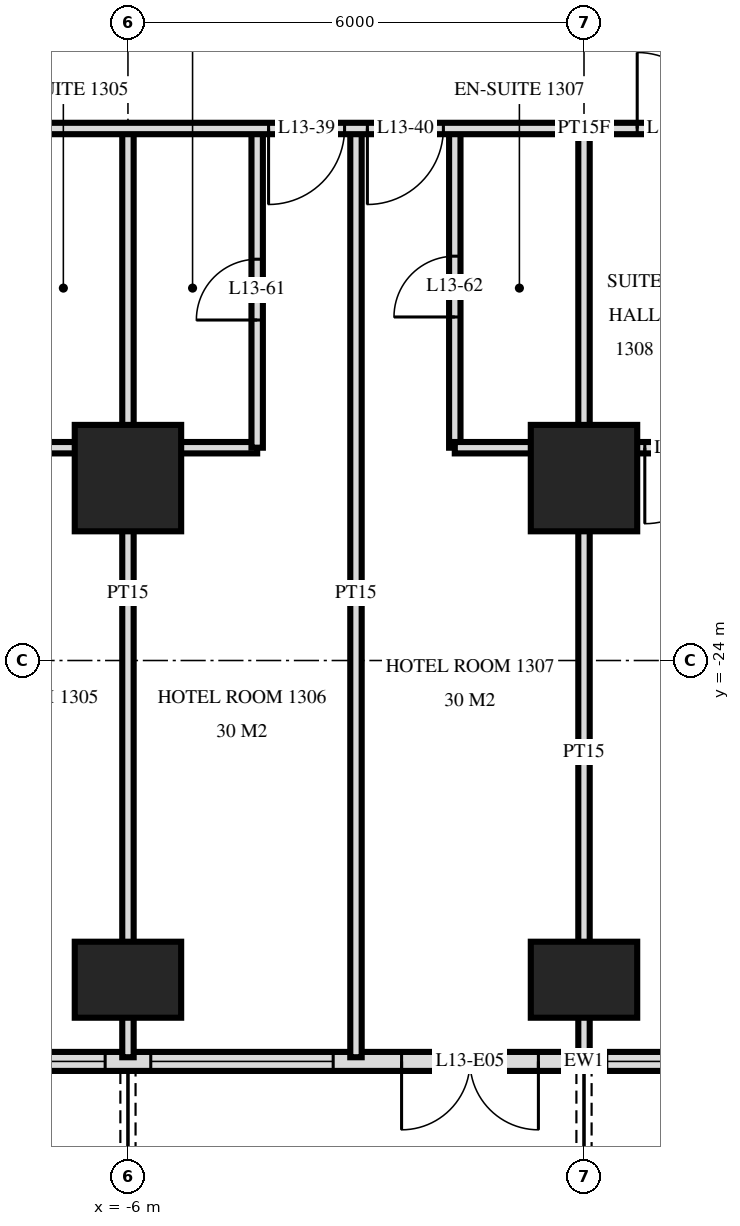
"""IFC4 building model, lengths in metres.
Left out: names, types, materials, properties, quantities, classifications, styles, units other than length and angle.
Written with IfcOpenShell. Run it as: python <this file> out.ifc"""

import sys

from ifc_helpers import new_model, si_unit, direction, frame, frame_2d, origin, origin_2d, place, context, subcontext, project, spatial, rectangle, extrude, element, fill, save


model = new_model("IFC4")
c1 = context("Model", 3, precision=1e-05, world=origin(), true_north=direction((0.0, 1.0)))
c2 = subcontext(c1, "Body", "Model", "MODEL_VIEW")
j1 = project(units=[si_unit("LENGTHUNIT", "METRE"), si_unit("PLANEANGLEUNIT", "RADIAN")], contexts=[c1])
p1 = place(None, origin())
s1 = spatial("IfcSite", under=j1, at=p1, CompositionType="ELEMENT")
p2 = place(p1, origin())
s2 = spatial("IfcBuilding", under=s1, at=p2, CompositionType="ELEMENT")
p3 = place(p2, frame((0.0, 0.0, 56.4)))
s3 = spatial("IfcBuildingStorey", under=s2, at=p3, CompositionType="ELEMENT", Elevation=56.4)
p4 = place(p3, frame((-6.0, -28.2, 0.0), z_axis=(0.0, 0.0, 1.0), x_axis=(1.0, 0.0, 0.0)))
e1 = element("IfcColumn", 1, at=p4, inside=s3, PredefinedType="COLUMN", context=c2, shape_type="SweptSolid", body=[
    extrude(rectangle(XDim=1.4, YDim=1.0, at=origin_2d()), origin(), (0.0, 0.0, 1.0), 3.6),
])
p5 = place(p3, frame((-6.0, -21.6, 0.0), z_axis=(0.0, 0.0, 1.0), x_axis=(1.0, 0.0, 0.0)))
e2 = element("IfcColumn", 2, at=p5, inside=s3, PredefinedType="COLUMN", context=c2, shape_type="SweptSolid", body=[
    extrude(rectangle(XDim=1.4, YDim=1.4, at=origin_2d()), origin(), (0.0, 0.0, 1.0), 3.6),
])
p6 = place(p3, frame((0.0, -28.2, 0.0), z_axis=(0.0, 0.0, 1.0), x_axis=(1.0, 0.0, 0.0)))
e3 = element("IfcColumn", 3, at=p6, inside=s3, PredefinedType="COLUMN", context=c2, shape_type="SweptSolid", body=[
    extrude(rectangle(XDim=1.4, YDim=1.0, at=origin_2d()), origin(), (0.0, 0.0, 1.0), 3.6),
])
p7 = place(p3, frame((0.0, -21.6, 0.0), z_axis=(0.0, 0.0, 1.0), x_axis=(1.0, 0.0, 0.0)))
e4 = element("IfcColumn", 4, at=p7, inside=s3, PredefinedType="COLUMN", context=c2, shape_type="SweptSolid", body=[
    extrude(rectangle(XDim=1.4, YDim=1.4, at=origin_2d()), origin(), (0.0, 0.0, 1.0), 3.6),
])
p8 = place(p3, frame((-28.775, -29.275, 0.0), z_axis=(0.0, 0.0, 1.0), x_axis=(1.0, 0.0, 0.0)))
e5 = element("IfcWall", 5, at=p8, inside=s3, PredefinedType="SOLIDWALL", context=c2, shape_type="SweptSolid", body=[
    extrude(rectangle(XDim=57.551, YDim=0.25, at=frame_2d((28.775, 0.0))), origin(), (0.0, 0.0, 1.0), 3.32),
])
p9 = place(p8, frame((0.575, 0.0, 0.0)))
e6 = element("IfcOpeningElement", 6, at=p9, cuts=e5, PredefinedType="OPENING", context=c2, shape_type="SweptSolid", body=[
    extrude(rectangle(XDim=1.8, YDim=2.4, at=frame_2d((0.9, 1.2))), frame((0.0, 0.135, 0.0), z_axis=(0.0, -1.0, 0.0), x_axis=(1.0, 0.0, 0.0)), (0.0, 0.0, 1.0), 0.27),
])
p10 = place(p8, frame((5.375, 0.0, 0.0)))
e7 = element("IfcOpeningElement", 7, at=p10, cuts=e5, PredefinedType="OPENING", context=c2, shape_type="SweptSolid", body=[
    extrude(rectangle(XDim=1.8, YDim=2.4, at=frame_2d((0.9, 1.2))), frame((0.0, 0.135, 0.0), z_axis=(0.0, -1.0, 0.0), x_axis=(1.0, 0.0, 0.0)), (0.0, 0.0, 1.0), 0.27),
])
p11 = place(p8, frame((8.075, 0.0, 0.3)))
e8 = element("IfcOpeningElement", 8, at=p11, cuts=e5, PredefinedType="OPENING", context=c2, shape_type="SweptSolid", body=[
    extrude(rectangle(XDim=2.4, YDim=2.1, at=frame_2d((1.2, 1.05))), frame((0.0, 0.135, 0.0), z_axis=(0.0, -1.0, 0.0), x_axis=(1.0, 0.0, 0.0)), (0.0, 0.0, 1.0), 0.27),
])
p12 = place(p8, frame((11.375, 0.0, 0.0)))
e9 = element("IfcOpeningElement", 9, at=p12, cuts=e5, PredefinedType="OPENING", context=c2, shape_type="SweptSolid", body=[
    extrude(rectangle(XDim=1.8, YDim=2.4, at=frame_2d((0.9, 1.2))), frame((0.0, 0.135, 0.0), z_axis=(0.0, -1.0, 0.0), x_axis=(1.0, 0.0, 0.0)), (0.0, 0.0, 1.0), 0.27),
])
p13 = place(p8, frame((14.075, 0.0, 0.3)))
e10 = element("IfcOpeningElement", 10, at=p13, cuts=e5, PredefinedType="OPENING", context=c2, shape_type="SweptSolid", body=[
    extrude(rectangle(XDim=2.4, YDim=2.1, at=frame_2d((1.2, 1.05))), frame((0.0, 0.135, 0.0), z_axis=(0.0, -1.0, 0.0), x_axis=(1.0, 0.0, 0.0)), (0.0, 0.0, 1.0), 0.27),
])
p14 = place(p8, frame((17.375, 0.0, 0.0)))
e11 = element("IfcOpeningElement", 11, at=p14, cuts=e5, PredefinedType="OPENING", context=c2, shape_type="SweptSolid", body=[
    extrude(rectangle(XDim=1.8, YDim=2.4, at=frame_2d((0.9, 1.2))), frame((0.0, 0.135, 0.0), z_axis=(0.0, -1.0, 0.0), x_axis=(1.0, 0.0, 0.0)), (0.0, 0.0, 1.0), 0.27),
])
p15 = place(p8, frame((20.075, 0.0, 0.3)))
e12 = element("IfcOpeningElement", 12, at=p15, cuts=e5, PredefinedType="OPENING", context=c2, shape_type="SweptSolid", body=[
    extrude(rectangle(XDim=2.4, YDim=2.1, at=frame_2d((1.2, 1.05))), frame((0.0, 0.135, 0.0), z_axis=(0.0, -1.0, 0.0), x_axis=(1.0, 0.0, 0.0)), (0.0, 0.0, 1.0), 0.27),
])
p16 = place(p8, frame((23.075, 0.0, 0.3)))
e13 = element("IfcOpeningElement", 13, at=p16, cuts=e5, PredefinedType="OPENING", context=c2, shape_type="SweptSolid", body=[
    extrude(rectangle(XDim=2.4, YDim=2.1, at=frame_2d((1.2, 1.05))), frame((0.0, 0.135, 0.0), z_axis=(0.0, -1.0, 0.0), x_axis=(1.0, 0.0, 0.0)), (0.0, 0.0, 1.0), 0.27),
])
p17 = place(p8, frame((26.375, 0.0, 0.0)))
e14 = element("IfcOpeningElement", 14, at=p17, cuts=e5, PredefinedType="OPENING", context=c2, shape_type="SweptSolid", body=[
    extrude(rectangle(XDim=1.8, YDim=2.4, at=frame_2d((0.9, 1.2))), frame((0.0, 0.135, 0.0), z_axis=(0.0, -1.0, 0.0), x_axis=(1.0, 0.0, 0.0)), (0.0, 0.0, 1.0), 0.27),
])
p18 = place(p8, frame((29.075, 0.0, 0.3)))
e15 = element("IfcOpeningElement", 15, at=p18, cuts=e5, PredefinedType="OPENING", context=c2, shape_type="SweptSolid", body=[
    extrude(rectangle(XDim=2.4, YDim=2.1, at=frame_2d((1.2, 1.05))), frame((0.0, 0.135, 0.0), z_axis=(0.0, -1.0, 0.0), x_axis=(1.0, 0.0, 0.0)), (0.0, 0.0, 1.0), 0.27),
])
p19 = place(p8, frame((32.375, 0.0, 0.0)))
e16 = element("IfcOpeningElement", 16, at=p19, cuts=e5, PredefinedType="OPENING", context=c2, shape_type="SweptSolid", body=[
    extrude(rectangle(XDim=1.8, YDim=2.4, at=frame_2d((0.9, 1.2))), frame((0.0, 0.135, 0.0), z_axis=(0.0, -1.0, 0.0), x_axis=(1.0, 0.0, 0.0)), (0.0, 0.0, 1.0), 0.27),
])
p20 = place(p8, frame((35.375, 0.0, 0.0)))
e17 = element("IfcOpeningElement", 17, at=p20, cuts=e5, PredefinedType="OPENING", context=c2, shape_type="SweptSolid", body=[
    extrude(rectangle(XDim=1.8, YDim=2.4, at=frame_2d((0.9, 1.2))), frame((0.0, 0.135, 0.0), z_axis=(0.0, -1.0, 0.0), x_axis=(1.0, 0.0, 0.0)), (0.0, 0.0, 1.0), 0.27),
])
p21 = place(p8, frame((38.075, 0.0, 0.3)))
e18 = element("IfcOpeningElement", 18, at=p21, cuts=e5, PredefinedType="OPENING", context=c2, shape_type="SweptSolid", body=[
    extrude(rectangle(XDim=2.4, YDim=2.1, at=frame_2d((1.2, 1.05))), frame((0.0, 0.135, 0.0), z_axis=(0.0, -1.0, 0.0), x_axis=(1.0, 0.0, 0.0)), (0.0, 0.0, 1.0), 0.27),
])
p22 = place(p8, frame((41.375, 0.0, 0.0)))
e19 = element("IfcOpeningElement", 19, at=p22, cuts=e5, PredefinedType="OPENING", context=c2, shape_type="SweptSolid", body=[
    extrude(rectangle(XDim=1.8, YDim=2.4, at=frame_2d((0.9, 1.2))), frame((0.0, 0.135, 0.0), z_axis=(0.0, -1.0, 0.0), x_axis=(1.0, 0.0, 0.0)), (0.0, 0.0, 1.0), 0.27),
])
p23 = place(p8, frame((44.075, 0.0, 0.3)))
e20 = element("IfcOpeningElement", 20, at=p23, cuts=e5, PredefinedType="OPENING", context=c2, shape_type="SweptSolid", body=[
    extrude(rectangle(XDim=2.4, YDim=2.1, at=frame_2d((1.2, 1.05))), frame((0.0, 0.135, 0.0), z_axis=(0.0, -1.0, 0.0), x_axis=(1.0, 0.0, 0.0)), (0.0, 0.0, 1.0), 0.27),
])
p24 = place(p8, frame((47.075, 0.0, 0.3)))
e21 = element("IfcOpeningElement", 21, at=p24, cuts=e5, PredefinedType="OPENING", context=c2, shape_type="SweptSolid", body=[
    extrude(rectangle(XDim=2.4, YDim=2.1, at=frame_2d((1.2, 1.05))), frame((0.0, 0.135, 0.0), z_axis=(0.0, -1.0, 0.0), x_axis=(1.0, 0.0, 0.0)), (0.0, 0.0, 1.0), 0.27),
])
p25 = place(p8, frame((50.375, 0.0, 0.0)))
e22 = element("IfcOpeningElement", 22, at=p25, cuts=e5, PredefinedType="OPENING", context=c2, shape_type="SweptSolid", body=[
    extrude(rectangle(XDim=1.8, YDim=2.4, at=frame_2d((0.9, 1.2))), frame((0.0, 0.135, 0.0), z_axis=(0.0, -1.0, 0.0), x_axis=(1.0, 0.0, 0.0)), (0.0, 0.0, 1.0), 0.27),
])
p26 = place(p8, frame((53.375, 0.0, 0.0)))
e23 = element("IfcOpeningElement", 23, at=p26, cuts=e5, PredefinedType="OPENING", context=c2, shape_type="SweptSolid", body=[
    extrude(rectangle(XDim=1.8, YDim=2.4, at=frame_2d((0.9, 1.2))), frame((0.0, 0.135, 0.0), z_axis=(0.0, -1.0, 0.0), x_axis=(1.0, 0.0, 0.0)), (0.0, 0.0, 1.0), 0.27),
])
p27 = place(p3, frame((0.0, -21.2, 0.0), z_axis=(0.0, 0.0, 1.0), x_axis=(0.0, 1.0, 0.0)))
e24 = element("IfcWall", 24, at=p27, inside=s3, PredefinedType="PARTITIONING", context=c2, shape_type="SweptSolid", body=[
    extrude(rectangle(XDim=4.2, YDim=0.15, at=frame_2d((2.1, 0.0))), origin(), (0.0, 0.0, 1.0), 3.32),
])
p28 = place(p3, frame((0.0, -29.22, 0.0), z_axis=(0.0, 0.0, 1.0), x_axis=(0.0, 1.0, 0.0)))
e25 = element("IfcWall", 25, at=p28, inside=s3, PredefinedType="PARTITIONING", context=c2, shape_type="SweptSolid", body=[
    extrude(rectangle(XDim=8.02, YDim=0.15, at=frame_2d((4.01, 0.0))), origin(), (0.0, 0.0, 1.0), 3.32),
])
p29 = place(p3, frame((-1.7, -21.2, 0.0), z_axis=(0.0, 0.0, 1.0), x_axis=(0.0, 1.0, 0.0)))
e26 = element("IfcWall", 26, at=p29, inside=s3, PredefinedType="PARTITIONING", context=c2, shape_type="SweptSolid", body=[
    extrude(rectangle(XDim=4.2, YDim=0.15, at=frame_2d((2.1, 0.0))), origin(), (0.0, 0.0, 1.0), 3.32),
])
p30 = place(p29, frame((1.72, 0.0, 0.0)))
e27 = element("IfcOpeningElement", 27, at=p30, cuts=e26, PredefinedType="OPENING", context=c2, shape_type="SweptSolid", body=[
    extrude(rectangle(XDim=0.8, YDim=2.1, at=frame_2d((0.4, 1.05))), frame((0.0, 0.085, 0.0), z_axis=(0.0, -1.0, 0.0), x_axis=(1.0, 0.0, 0.0)), (0.0, 0.0, 1.0), 0.17),
])
p31 = place(p3, frame((-3.0, -29.22, 0.0), z_axis=(0.0, 0.0, 1.0), x_axis=(0.0, 1.0, 0.0)))
e28 = element("IfcWall", 28, at=p31, inside=s3, PredefinedType="PARTITIONING", context=c2, shape_type="SweptSolid", body=[
    extrude(rectangle(XDim=12.22, YDim=0.15, at=frame_2d((6.11, 0.0))), origin(), (0.0, 0.0, 1.0), 3.32),
])
p32 = place(p3, frame((-4.3, -21.2, 0.0), z_axis=(0.0, 0.0, 1.0), x_axis=(0.0, 1.0, 0.0)))
e29 = element("IfcWall", 29, at=p32, inside=s3, PredefinedType="PARTITIONING", context=c2, shape_type="SweptSolid", body=[
    extrude(rectangle(XDim=4.2, YDim=0.15, at=frame_2d((2.1, 0.0))), origin(), (0.0, 0.0, 1.0), 3.32),
])
p33 = place(p32, frame((1.68, 0.0, 0.0)))
e30 = element("IfcOpeningElement", 30, at=p33, cuts=e29, PredefinedType="OPENING", context=c2, shape_type="SweptSolid", body=[
    extrude(rectangle(XDim=0.8, YDim=2.1, at=frame_2d((0.4, 1.05))), frame((0.0, 0.085, 0.0), z_axis=(0.0, -1.0, 0.0), x_axis=(1.0, 0.0, 0.0)), (0.0, 0.0, 1.0), 0.17),
])
p34 = place(p3, frame((-6.0, -29.22, 0.0), z_axis=(0.0, 0.0, 1.0), x_axis=(0.0, 1.0, 0.0)))
e31 = element("IfcWall", 31, at=p34, inside=s3, PredefinedType="PARTITIONING", context=c2, shape_type="SweptSolid", body=[
    extrude(rectangle(XDim=12.22, YDim=0.15, at=frame_2d((6.11, 0.0))), origin(), (0.0, 0.0, 1.0), 3.32),
])
p35 = place(p3, frame((0.0, -21.2, 0.0), z_axis=(0.0, 0.0, 1.0), x_axis=(1.0, 0.0, 0.0)))
e32 = element("IfcWall", 32, at=p35, inside=s3, PredefinedType="PARTITIONING", context=c2, shape_type="SweptSolid", body=[
    extrude(rectangle(XDim=2.4, YDim=0.15, at=frame_2d((1.2, 0.0))), origin(), (0.0, 0.0, 1.0), 3.32),
])
p36 = place(p35, frame((0.8, 0.0, 0.0)))
e33 = element("IfcOpeningElement", 33, at=p36, cuts=e32, PredefinedType="OPENING", context=c2, shape_type="SweptSolid", body=[
    extrude(rectangle(XDim=1.0, YDim=2.1, at=frame_2d((0.5, 1.05))), frame((0.0, 0.085, 0.0), z_axis=(0.0, -1.0, 0.0), x_axis=(1.0, 0.0, 0.0)), (0.0, 0.0, 1.0), 0.17),
])
p37 = place(p3, frame((-7.7, -21.2, 0.0), z_axis=(0.0, 0.0, 1.0), x_axis=(1.0, 0.0, 0.0)))
e34 = element("IfcWall", 34, at=p37, inside=s3, PredefinedType="PARTITIONING", context=c2, shape_type="SweptSolid", body=[
    extrude(rectangle(XDim=3.4, YDim=0.15, at=frame_2d((1.7, 0.0))), origin(), (0.0, 0.0, 1.0), 3.32),
])
p38 = place(p3, frame((-1.7, -21.2, 0.0), z_axis=(0.0, 0.0, 1.0), x_axis=(1.0, 0.0, 0.0)))
e35 = element("IfcWall", 35, at=p38, inside=s3, PredefinedType="PARTITIONING", context=c2, shape_type="SweptSolid", body=[
    extrude(rectangle(XDim=1.7, YDim=0.15, at=frame_2d((0.85, 0.0))), origin(), (0.0, 0.0, 1.0), 3.32),
])
p39 = place(p3, frame((-33.12, -17.0, 0.0), z_axis=(0.0, 0.0, 1.0), x_axis=(1.0, 0.0, 0.0)))
e36 = element("IfcWall", 36, at=p39, inside=s3, PredefinedType="PARTITIONING", context=c2, shape_type="SweptSolid", body=[
    extrude(rectangle(XDim=66.24, YDim=0.15, at=frame_2d((33.12, 0.0))), origin(), (0.0, 0.0, 1.0), 3.32),
])
p40 = place(p39, frame((12.27, 0.0, 0.0)))
e37 = element("IfcOpeningElement", 37, at=p40, cuts=e36, PredefinedType="OPENING", context=c2, shape_type="SweptSolid", body=[
    extrude(rectangle(XDim=1.0, YDim=2.1, at=frame_2d((0.5, 1.05))), frame((0.0, 0.085, 0.0), z_axis=(0.0, -1.0, 0.0), x_axis=(1.0, 0.0, 0.0)), (0.0, 0.0, 1.0), 0.17),
])
p41 = place(p39, frame((16.97, 0.0, 0.0)))
e38 = element("IfcOpeningElement", 38, at=p41, cuts=e36, PredefinedType="OPENING", context=c2, shape_type="SweptSolid", body=[
    extrude(rectangle(XDim=1.0, YDim=2.1, at=frame_2d((0.5, 1.05))), frame((0.0, 0.085, 0.0), z_axis=(0.0, -1.0, 0.0), x_axis=(1.0, 0.0, 0.0)), (0.0, 0.0, 1.0), 0.17),
])
p42 = place(p39, frame((18.27, 0.0, 0.0)))
e39 = element("IfcOpeningElement", 39, at=p42, cuts=e36, PredefinedType="OPENING", context=c2, shape_type="SweptSolid", body=[
    extrude(rectangle(XDim=1.0, YDim=2.1, at=frame_2d((0.5, 1.05))), frame((0.0, 0.085, 0.0), z_axis=(0.0, -1.0, 0.0), x_axis=(1.0, 0.0, 0.0)), (0.0, 0.0, 1.0), 0.17),
])
p43 = place(p39, frame((22.97, 0.0, 0.0)))
e40 = element("IfcOpeningElement", 40, at=p43, cuts=e36, PredefinedType="OPENING", context=c2, shape_type="SweptSolid", body=[
    extrude(rectangle(XDim=1.0, YDim=2.1, at=frame_2d((0.5, 1.05))), frame((0.0, 0.085, 0.0), z_axis=(0.0, -1.0, 0.0), x_axis=(1.0, 0.0, 0.0)), (0.0, 0.0, 1.0), 0.17),
])
p44 = place(p39, frame((24.27, 0.0, 0.0)))
e41 = element("IfcOpeningElement", 41, at=p44, cuts=e36, PredefinedType="OPENING", context=c2, shape_type="SweptSolid", body=[
    extrude(rectangle(XDim=1.0, YDim=2.1, at=frame_2d((0.5, 1.05))), frame((0.0, 0.085, 0.0), z_axis=(0.0, -1.0, 0.0), x_axis=(1.0, 0.0, 0.0)), (0.0, 0.0, 1.0), 0.17),
])
p45 = place(p39, frame((28.97, 0.0, 0.0)))
e42 = element("IfcOpeningElement", 42, at=p45, cuts=e36, PredefinedType="OPENING", context=c2, shape_type="SweptSolid", body=[
    extrude(rectangle(XDim=1.0, YDim=2.1, at=frame_2d((0.5, 1.05))), frame((0.0, 0.085, 0.0), z_axis=(0.0, -1.0, 0.0), x_axis=(1.0, 0.0, 0.0)), (0.0, 0.0, 1.0), 0.17),
])
p46 = place(p39, frame((30.27, 0.0, 0.0)))
e43 = element("IfcOpeningElement", 43, at=p46, cuts=e36, PredefinedType="OPENING", context=c2, shape_type="SweptSolid", body=[
    extrude(rectangle(XDim=1.0, YDim=2.1, at=frame_2d((0.5, 1.05))), frame((0.0, 0.085, 0.0), z_axis=(0.0, -1.0, 0.0), x_axis=(1.0, 0.0, 0.0)), (0.0, 0.0, 1.0), 0.17),
])
p47 = place(p39, frame((33.82, 0.0, 0.0)))
e44 = element("IfcOpeningElement", 44, at=p47, cuts=e36, PredefinedType="OPENING", context=c2, shape_type="SweptSolid", body=[
    extrude(rectangle(XDim=1.0, YDim=2.1, at=frame_2d((0.5, 1.05))), frame((0.0, 0.085, 0.0), z_axis=(0.0, -1.0, 0.0), x_axis=(1.0, 0.0, 0.0)), (0.0, 0.0, 1.0), 0.17),
])
p48 = place(p39, frame((46.27, 0.0, 0.0)))
e45 = element("IfcOpeningElement", 45, at=p48, cuts=e36, PredefinedType="OPENING", context=c2, shape_type="SweptSolid", body=[
    extrude(rectangle(XDim=1.0, YDim=2.1, at=frame_2d((0.5, 1.05))), frame((0.0, 0.085, 0.0), z_axis=(0.0, -1.0, 0.0), x_axis=(1.0, 0.0, 0.0)), (0.0, 0.0, 1.0), 0.17),
])
p49 = place(p39, frame((52.97, 0.0, 0.0)))
e46 = element("IfcOpeningElement", 46, at=p49, cuts=e36, PredefinedType="OPENING", context=c2, shape_type="SweptSolid", body=[
    extrude(rectangle(XDim=1.0, YDim=2.1, at=frame_2d((0.5, 1.05))), frame((0.0, 0.085, 0.0), z_axis=(0.0, -1.0, 0.0), x_axis=(1.0, 0.0, 0.0)), (0.0, 0.0, 1.0), 0.17),
])
p50 = place(p39, frame((6.05, 0.0, 0.0)))
e47 = element("IfcOpeningElement", 47, at=p50, cuts=e36, PredefinedType="OPENING", context=c2, shape_type="SweptSolid", body=[
    extrude(rectangle(XDim=1.0, YDim=2.1, at=frame_2d((0.5, 1.05))), frame((0.0, 0.085, 0.0), z_axis=(0.0, -1.0, 0.0), x_axis=(1.0, 0.0, 0.0)), (0.0, 0.0, 1.0), 0.17),
])
p51 = place(p39, frame((59.15, 0.0, 0.0)))
e48 = element("IfcOpeningElement", 48, at=p51, cuts=e36, PredefinedType="OPENING", context=c2, shape_type="SweptSolid", body=[
    extrude(rectangle(XDim=1.0, YDim=2.1, at=frame_2d((0.5, 1.05))), frame((0.0, 0.085, 0.0), z_axis=(0.0, -1.0, 0.0), x_axis=(1.0, 0.0, 0.0)), (0.0, 0.0, 1.0), 0.17),
])
p52 = place(p15, origin())
e49 = element("IfcWindow", 49, at=p52, inside=s3, PartitioningType="SINGLE_PANEL", PredefinedType="WINDOW", context=c2, shape_type="SweptSolid", body=[
    extrude(rectangle(XDim=2.4, YDim=2.1, at=frame_2d((1.2, 1.05))), frame((0.0, 0.03, 0.0), z_axis=(0.0, -1.0, 0.0), x_axis=(1.0, 0.0, 0.0)), (0.0, 0.0, 1.0), 0.06),
])
fill(e12, e49)
p53 = place(p16, origin())
e50 = element("IfcWindow", 50, at=p53, inside=s3, PartitioningType="SINGLE_PANEL", PredefinedType="WINDOW", context=c2, shape_type="SweptSolid", body=[
    extrude(rectangle(XDim=2.4, YDim=2.1, at=frame_2d((1.2, 1.05))), frame((0.0, 0.03, 0.0), z_axis=(0.0, -1.0, 0.0), x_axis=(1.0, 0.0, 0.0)), (0.0, 0.0, 1.0), 0.06),
])
fill(e13, e50)
p54 = place(p17, frame((0.9, 0.0, 0.0), z_axis=(0.0, 0.0, 1.0), x_axis=(-1.0, 0.0, 0.0)))
e51 = element("IfcDoor", 51, at=p54, inside=s3, OperationType="DOUBLE_DOOR_SINGLE_SWING", PredefinedType="DOOR", context=c2, shape_type="SweptSolid", body=[
    extrude(rectangle(XDim=1.8, YDim=2.4, at=frame_2d((0.0, 1.2))), frame((0.0, -0.025, 0.0), z_axis=(0.0, 1.0, 0.0), x_axis=(-1.0, 0.0, 0.0)), (0.0, 0.0, 1.0), 0.05),
])
fill(e14, e51)
p55 = place(p18, origin())
e52 = element("IfcWindow", 52, at=p55, inside=s3, PartitioningType="SINGLE_PANEL", PredefinedType="WINDOW", context=c2, shape_type="SweptSolid", body=[
    extrude(rectangle(XDim=2.4, YDim=2.1, at=frame_2d((1.2, 1.05))), frame((0.0, 0.03, 0.0), z_axis=(0.0, -1.0, 0.0), x_axis=(1.0, 0.0, 0.0)), (0.0, 0.0, 1.0), 0.06),
])
fill(e15, e52)
p56 = place(p45, frame((0.5, 0.0, 0.0), z_axis=(0.0, 0.0, 1.0), x_axis=(-1.0, 0.0, 0.0)))
e53 = element("IfcDoor", 53, at=p56, inside=s3, OperationType="SINGLE_SWING_LEFT", PredefinedType="DOOR", context=c2, shape_type="SweptSolid", body=[
    extrude(rectangle(XDim=1.0, YDim=2.1, at=frame_2d((0.0, 1.05))), frame((0.0, -0.025, 0.0), z_axis=(0.0, 1.0, 0.0), x_axis=(-1.0, 0.0, 0.0)), (0.0, 0.0, 1.0), 0.05),
])
fill(e42, e53)
p57 = place(p46, frame((0.5, 0.0, 0.0), z_axis=(0.0, 0.0, 1.0), x_axis=(-1.0, 0.0, 0.0)))
e54 = element("IfcDoor", 54, at=p57, inside=s3, OperationType="SINGLE_SWING_LEFT", PredefinedType="DOOR", context=c2, shape_type="SweptSolid", body=[
    extrude(rectangle(XDim=1.0, YDim=2.1, at=frame_2d((0.0, 1.05))), frame((0.0, -0.025, 0.0), z_axis=(0.0, 1.0, 0.0), x_axis=(-1.0, 0.0, 0.0)), (0.0, 0.0, 1.0), 0.05),
])
fill(e43, e54)
p58 = place(p47, origin())
e55 = element("IfcDoor", 55, at=p58, inside=s3, OperationType="SINGLE_SWING_RIGHT", PredefinedType="DOOR", context=c2, shape_type="SweptSolid", body=[
    extrude(rectangle(XDim=1.0, YDim=2.1, at=frame_2d((0.5, 1.05))), frame((0.0, 0.025, 0.0), z_axis=(0.0, -1.0, 0.0), x_axis=(1.0, 0.0, 0.0)), (0.0, 0.0, 1.0), 0.05),
])
fill(e44, e55)
p59 = place(p33, origin())
e56 = element("IfcDoor", 56, at=p59, inside=s3, OperationType="SINGLE_SWING_RIGHT", PredefinedType="DOOR", context=c2, shape_type="SweptSolid", body=[
    extrude(rectangle(XDim=0.8, YDim=2.1, at=frame_2d((0.4, 1.05))), frame((0.0, 0.025, 0.0), z_axis=(0.0, -1.0, 0.0), x_axis=(1.0, 0.0, 0.0)), (0.0, 0.0, 1.0), 0.05),
])
fill(e30, e56)
p60 = place(p30, origin())
e57 = element("IfcDoor", 57, at=p60, inside=s3, OperationType="SINGLE_SWING_RIGHT", PredefinedType="DOOR", context=c2, shape_type="SweptSolid", body=[
    extrude(rectangle(XDim=0.8, YDim=2.1, at=frame_2d((0.4, 1.05))), frame((0.0, 0.025, 0.0), z_axis=(0.0, -1.0, 0.0), x_axis=(1.0, 0.0, 0.0)), (0.0, 0.0, 1.0), 0.05),
])
fill(e27, e57)
p61 = place(p36, frame((0.5, 0.0, 0.0), z_axis=(0.0, 0.0, 1.0), x_axis=(-1.0, 0.0, 0.0)))
e58 = element("IfcDoor", 58, at=p61, inside=s3, OperationType="SINGLE_SWING_LEFT", PredefinedType="DOOR", context=c2, shape_type="SweptSolid", body=[
    extrude(rectangle(XDim=1.0, YDim=2.1, at=frame_2d((0.0, 1.05))), frame((0.0, -0.025, 0.0), z_axis=(0.0, 1.0, 0.0), x_axis=(-1.0, 0.0, 0.0)), (0.0, 0.0, 1.0), 0.05),
])
fill(e33, e58)
save(model, sys.argv[1])
